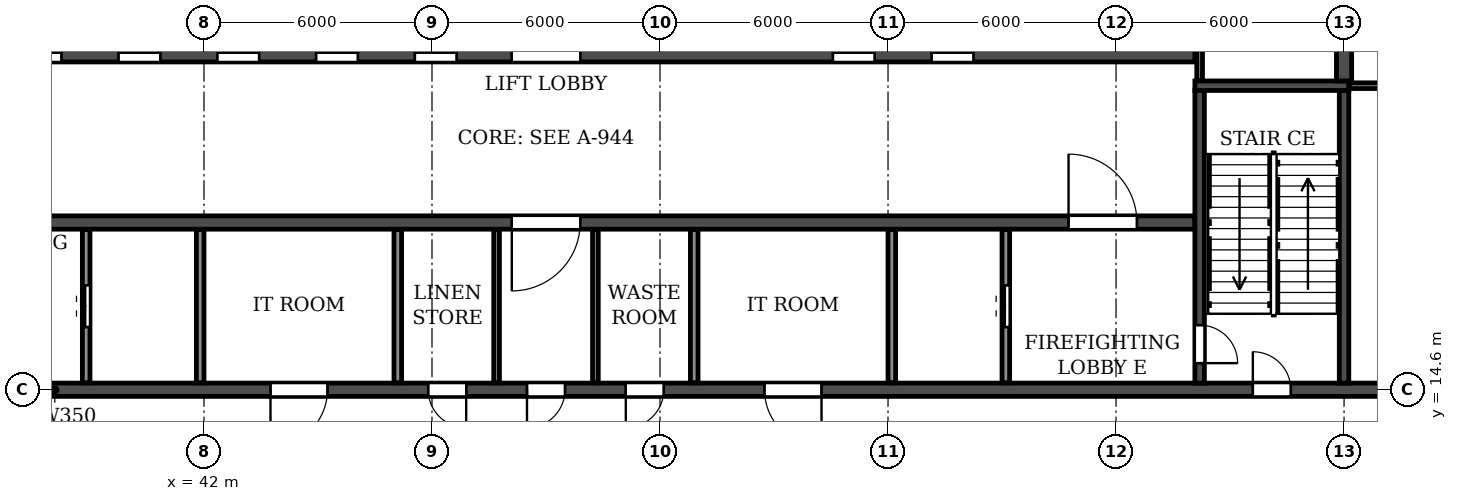
"""IFC4 building model, lengths in metres.
Left out: names, types, materials, properties, quantities, classifications, styles, units other than length and angle.
Written with IfcOpenShell. Run it as: python <this file> out.ifc"""

import sys

from ifc_helpers import new_model, si_unit, direction, frame, frame_2d, origin, place, context, subcontext, project, spatial, rectangle, extrude, element, fill, save


model = new_model("IFC4")
c1 = context("Model", 3, precision=1e-05, world=origin(), true_north=direction((0.0, 1.0)))
c2 = subcontext(c1, "Body", "Model", "MODEL_VIEW")
j1 = project(units=[si_unit("LENGTHUNIT", "METRE"), si_unit("PLANEANGLEUNIT", "RADIAN")], contexts=[c1])
p1 = place(None, origin())
s1 = spatial("IfcSite", under=j1, at=p1, CompositionType="ELEMENT")
p2 = place(p1, origin())
s2 = spatial("IfcBuilding", under=s1, at=p2, CompositionType="ELEMENT")
p3 = place(p2, frame((0.0, 0.0, 261.0)))
s3 = spatial("IfcBuildingStorey", under=s2, at=p3, CompositionType="ELEMENT", Elevation=261.0)
p4 = place(p3, frame((18.2, 14.6, 0.0), z_axis=(0.0, 0.0, 1.0), x_axis=(1.0, 0.0, 0.0)))
e1 = element("IfcWall", 1, at=p4, inside=s3, PredefinedType="SOLIDWALL", context=c2, shape_type="SweptSolid", body=[
    extrude(rectangle(XDim=65.6, YDim=0.35, at=frame_2d((32.8, 0.0))), origin(), (0.0, 0.0, 1.0), 5.7),
])
p5 = place(p4, frame((0.7, 0.0, 0.0)))
e2 = element("IfcOpeningElement", 2, at=p5, cuts=e1, PredefinedType="OPENING", context=c2, shape_type="SweptSolid", body=[
    extrude(rectangle(XDim=1.0, YDim=2.1, at=frame_2d((0.5, 1.05))), frame((0.0, 0.185, 0.0), z_axis=(0.0, -1.0, 0.0), x_axis=(1.0, 0.0, 0.0)), (0.0, 0.0, 1.0), 0.37),
])
p6 = place(p4, frame((8.7, 0.0, 0.0)))
e3 = element("IfcOpeningElement", 3, at=p6, cuts=e1, PredefinedType="OPENING", context=c2, shape_type="SweptSolid", body=[
    extrude(rectangle(XDim=0.8, YDim=2.1, at=frame_2d((0.4, 1.05))), frame((0.0, 0.185, 0.0), z_axis=(0.0, -1.0, 0.0), x_axis=(1.0, 0.0, 0.0)), (0.0, 0.0, 1.0), 0.37),
])
p7 = place(p4, frame((13.2, 0.0, 0.0)))
e4 = element("IfcOpeningElement", 4, at=p7, cuts=e1, PredefinedType="OPENING", context=c2, shape_type="SweptSolid", body=[
    extrude(rectangle(XDim=1.0, YDim=2.1, at=frame_2d((0.5, 1.05))), frame((0.0, 0.185, 0.0), z_axis=(0.0, -1.0, 0.0), x_axis=(1.0, 0.0, 0.0)), (0.0, 0.0, 1.0), 0.37),
])
p8 = place(p4, frame((25.55, 0.0, 0.0)))
e5 = element("IfcOpeningElement", 5, at=p8, cuts=e1, PredefinedType="OPENING", context=c2, shape_type="SweptSolid", body=[
    extrude(rectangle(XDim=1.5, YDim=2.1, at=frame_2d((0.75, 1.05))), frame((0.0, 0.185, 0.0), z_axis=(0.0, -1.0, 0.0), x_axis=(1.0, 0.0, 0.0)), (0.0, 0.0, 1.0), 0.37),
])
p9 = place(p4, frame((29.7, 0.0, 0.0)))
e6 = element("IfcOpeningElement", 6, at=p9, cuts=e1, PredefinedType="OPENING", context=c2, shape_type="SweptSolid", body=[
    extrude(rectangle(XDim=1.0, YDim=2.1, at=frame_2d((0.5, 1.05))), frame((0.0, 0.185, 0.0), z_axis=(0.0, -1.0, 0.0), x_axis=(1.0, 0.0, 0.0)), (0.0, 0.0, 1.0), 0.37),
])
p10 = place(p4, frame((32.3, 0.0, 0.0)))
e7 = element("IfcOpeningElement", 7, at=p10, cuts=e1, PredefinedType="OPENING", context=c2, shape_type="SweptSolid", body=[
    extrude(rectangle(XDim=1.0, YDim=2.1, at=frame_2d((0.5, 1.05))), frame((0.0, 0.185, 0.0), z_axis=(0.0, -1.0, 0.0), x_axis=(1.0, 0.0, 0.0)), (0.0, 0.0, 1.0), 0.37),
])
p11 = place(p4, frame((34.9, 0.0, 0.0)))
e8 = element("IfcOpeningElement", 8, at=p11, cuts=e1, PredefinedType="OPENING", context=c2, shape_type="SweptSolid", body=[
    extrude(rectangle(XDim=1.0, YDim=2.1, at=frame_2d((0.5, 1.05))), frame((0.0, 0.185, 0.0), z_axis=(0.0, -1.0, 0.0), x_axis=(1.0, 0.0, 0.0)), (0.0, 0.0, 1.0), 0.37),
])
p12 = place(p4, frame((38.55, 0.0, 0.0)))
e9 = element("IfcOpeningElement", 9, at=p12, cuts=e1, PredefinedType="OPENING", context=c2, shape_type="SweptSolid", body=[
    extrude(rectangle(XDim=1.5, YDim=2.1, at=frame_2d((0.75, 1.05))), frame((0.0, 0.185, 0.0), z_axis=(0.0, -1.0, 0.0), x_axis=(1.0, 0.0, 0.0)), (0.0, 0.0, 1.0), 0.37),
])
p13 = place(p4, frame((51.4, 0.0, 0.0)))
e10 = element("IfcOpeningElement", 10, at=p13, cuts=e1, PredefinedType="OPENING", context=c2, shape_type="SweptSolid", body=[
    extrude(rectangle(XDim=1.0, YDim=2.1, at=frame_2d((0.5, 1.05))), frame((0.0, 0.185, 0.0), z_axis=(0.0, -1.0, 0.0), x_axis=(1.0, 0.0, 0.0)), (0.0, 0.0, 1.0), 0.37),
])
p14 = place(p4, frame((56.1, 0.0, 0.0)))
e11 = element("IfcOpeningElement", 11, at=p14, cuts=e1, PredefinedType="OPENING", context=c2, shape_type="SweptSolid", body=[
    extrude(rectangle(XDim=0.8, YDim=2.1, at=frame_2d((0.4, 1.05))), frame((0.0, 0.185, 0.0), z_axis=(0.0, -1.0, 0.0), x_axis=(1.0, 0.0, 0.0)), (0.0, 0.0, 1.0), 0.37),
])
p15 = place(p4, frame((63.9, 0.0, 0.0)))
e12 = element("IfcOpeningElement", 12, at=p15, cuts=e1, PredefinedType="OPENING", context=c2, shape_type="SweptSolid", body=[
    extrude(rectangle(XDim=1.0, YDim=2.1, at=frame_2d((0.5, 1.05))), frame((0.0, 0.185, 0.0), z_axis=(0.0, -1.0, 0.0), x_axis=(1.0, 0.0, 0.0)), (0.0, 0.0, 1.0), 0.37),
])
p16 = place(p3, frame((33.925, 19.0, 0.0), z_axis=(0.0, 0.0, 1.0), x_axis=(1.0, 0.0, 0.0)))
e13 = element("IfcWall", 13, at=p16, inside=s3, PredefinedType="SOLIDWALL", context=c2, shape_type="SweptSolid", body=[
    extrude(rectangle(XDim=34.15, YDim=0.35, at=frame_2d((17.075, 0.0))), origin(), (0.0, 0.0, 1.0), 5.7),
])
p17 = place(p16, frame((16.175, 0.0, 0.0)))
e14 = element("IfcOpeningElement", 14, at=p17, cuts=e13, PredefinedType="OPENING", context=c2, shape_type="SweptSolid", body=[
    extrude(rectangle(XDim=1.8, YDim=2.1, at=frame_2d((0.9, 1.05))), frame((0.0, 0.185, 0.0), z_axis=(0.0, -1.0, 0.0), x_axis=(1.0, 0.0, 0.0)), (0.0, 0.0, 1.0), 0.37),
])
p18 = place(p16, frame((1.525, 0.0, 0.0)))
e15 = element("IfcOpeningElement", 15, at=p18, cuts=e13, PredefinedType="OPENING", context=c2, shape_type="SweptSolid", body=[
    extrude(rectangle(XDim=1.8, YDim=2.1, at=frame_2d((0.9, 1.05))), frame((0.0, 0.185, 0.0), z_axis=(0.0, -1.0, 0.0), x_axis=(1.0, 0.0, 0.0)), (0.0, 0.0, 1.0), 0.37),
])
p19 = place(p16, frame((30.825, 0.0, 0.0)))
e16 = element("IfcOpeningElement", 16, at=p19, cuts=e13, PredefinedType="OPENING", context=c2, shape_type="SweptSolid", body=[
    extrude(rectangle(XDim=1.8, YDim=2.1, at=frame_2d((0.9, 1.05))), frame((0.0, 0.185, 0.0), z_axis=(0.0, -1.0, 0.0), x_axis=(1.0, 0.0, 0.0)), (0.0, 0.0, 1.0), 0.37),
])
p20 = place(p3, frame((33.925, 23.4, 0.0), z_axis=(0.0, 0.0, 1.0), x_axis=(1.0, 0.0, 0.0)))
e17 = element("IfcWall", 17, at=p20, inside=s3, PredefinedType="SOLIDWALL", context=c2, shape_type="SweptSolid", body=[
    extrude(rectangle(XDim=34.15, YDim=0.35, at=frame_2d((17.075, 0.0))), origin(), (0.0, 0.0, 1.0), 5.7),
])
p21 = place(p20, frame((16.175, 0.0, 0.0)))
e18 = element("IfcOpeningElement", 18, at=p21, cuts=e17, PredefinedType="OPENING", context=c2, shape_type="SweptSolid", body=[
    extrude(rectangle(XDim=1.8, YDim=2.1, at=frame_2d((0.9, 1.05))), frame((0.0, 0.185, 0.0), z_axis=(0.0, -1.0, 0.0), x_axis=(1.0, 0.0, 0.0)), (0.0, 0.0, 1.0), 0.37),
])
p22 = place(p20, frame((0.625, 0.0, 0.0)))
e19 = element("IfcOpeningElement", 19, at=p22, cuts=e17, PredefinedType="OPENING", context=c2, shape_type="SweptSolid", body=[
    extrude(rectangle(XDim=1.1, YDim=2.1, at=frame_2d((0.55, 1.05))), frame((0.0, 0.185, 0.0), z_axis=(0.0, -1.0, 0.0), x_axis=(1.0, 0.0, 0.0)), (0.0, 0.0, 1.0), 0.37),
])
p23 = place(p20, frame((3.225, 0.0, 0.0)))
e20 = element("IfcOpeningElement", 20, at=p23, cuts=e17, PredefinedType="OPENING", context=c2, shape_type="SweptSolid", body=[
    extrude(rectangle(XDim=1.1, YDim=2.1, at=frame_2d((0.55, 1.05))), frame((0.0, 0.185, 0.0), z_axis=(0.0, -1.0, 0.0), x_axis=(1.0, 0.0, 0.0)), (0.0, 0.0, 1.0), 0.37),
])
p24 = place(p20, frame((5.825, 0.0, 0.0)))
e21 = element("IfcOpeningElement", 21, at=p24, cuts=e17, PredefinedType="OPENING", context=c2, shape_type="SweptSolid", body=[
    extrude(rectangle(XDim=1.1, YDim=2.1, at=frame_2d((0.55, 1.05))), frame((0.0, 0.185, 0.0), z_axis=(0.0, -1.0, 0.0), x_axis=(1.0, 0.0, 0.0)), (0.0, 0.0, 1.0), 0.37),
])
p25 = place(p20, frame((8.425, 0.0, 0.0)))
e22 = element("IfcOpeningElement", 22, at=p25, cuts=e17, PredefinedType="OPENING", context=c2, shape_type="SweptSolid", body=[
    extrude(rectangle(XDim=1.1, YDim=2.1, at=frame_2d((0.55, 1.05))), frame((0.0, 0.185, 0.0), z_axis=(0.0, -1.0, 0.0), x_axis=(1.0, 0.0, 0.0)), (0.0, 0.0, 1.0), 0.37),
])
p26 = place(p20, frame((11.025, 0.0, 0.0)))
e23 = element("IfcOpeningElement", 23, at=p26, cuts=e17, PredefinedType="OPENING", context=c2, shape_type="SweptSolid", body=[
    extrude(rectangle(XDim=1.1, YDim=2.1, at=frame_2d((0.55, 1.05))), frame((0.0, 0.185, 0.0), z_axis=(0.0, -1.0, 0.0), x_axis=(1.0, 0.0, 0.0)), (0.0, 0.0, 1.0), 0.37),
])
p27 = place(p20, frame((13.625, 0.0, 0.0)))
e24 = element("IfcOpeningElement", 24, at=p27, cuts=e17, PredefinedType="OPENING", context=c2, shape_type="SweptSolid", body=[
    extrude(rectangle(XDim=1.1, YDim=2.1, at=frame_2d((0.55, 1.05))), frame((0.0, 0.185, 0.0), z_axis=(0.0, -1.0, 0.0), x_axis=(1.0, 0.0, 0.0)), (0.0, 0.0, 1.0), 0.37),
])
p28 = place(p20, frame((24.625, 0.0, 0.0)))
e25 = element("IfcOpeningElement", 25, at=p28, cuts=e17, PredefinedType="OPENING", context=c2, shape_type="SweptSolid", body=[
    extrude(rectangle(XDim=1.1, YDim=2.1, at=frame_2d((0.55, 1.05))), frame((0.0, 0.185, 0.0), z_axis=(0.0, -1.0, 0.0), x_axis=(1.0, 0.0, 0.0)), (0.0, 0.0, 1.0), 0.37),
])
p29 = place(p20, frame((27.225, 0.0, 0.0)))
e26 = element("IfcOpeningElement", 26, at=p29, cuts=e17, PredefinedType="OPENING", context=c2, shape_type="SweptSolid", body=[
    extrude(rectangle(XDim=1.1, YDim=2.1, at=frame_2d((0.55, 1.05))), frame((0.0, 0.185, 0.0), z_axis=(0.0, -1.0, 0.0), x_axis=(1.0, 0.0, 0.0)), (0.0, 0.0, 1.0), 0.37),
])
p30 = place(p3, frame((72.0, 22.725, 0.0), z_axis=(0.0, 0.0, 1.0), x_axis=(0.0, 1.0, 0.0)))
e27 = element("IfcWall", 27, at=p30, inside=s3, PredefinedType="SOLIDWALL", context=c2, shape_type="SweptSolid", body=[
    extrude(rectangle(XDim=4.9, YDim=0.4, at=frame_2d((2.45, 0.0))), origin(), (0.0, 0.0, 1.0), 5.7),
])
p31 = place(p3, frame((68.2, 14.775, 0.0), z_axis=(0.0, 0.0, 1.0), x_axis=(0.0, 1.0, 0.0)))
e28 = element("IfcWall", 28, at=p31, inside=s3, PredefinedType="SOLIDWALL", context=c2, shape_type="SweptSolid", body=[
    extrude(rectangle(XDim=7.7, YDim=0.25, at=frame_2d((3.85, 0.0))), origin(), (0.0, 0.0, 1.0), 5.7),
])
p32 = place(p31, frame((0.525, 0.0, 0.0)))
e29 = element("IfcOpeningElement", 29, at=p32, cuts=e28, PredefinedType="OPENING", context=c2, shape_type="SweptSolid", body=[
    extrude(rectangle(XDim=1.0, YDim=2.1, at=frame_2d((0.5, 1.05))), frame((0.0, 0.135, 0.0), z_axis=(0.0, -1.0, 0.0), x_axis=(1.0, 0.0, 0.0)), (0.0, 0.0, 1.0), 0.27),
])
p33 = place(p3, frame((72.0, 14.775, 0.0), z_axis=(0.0, 0.0, 1.0), x_axis=(0.0, 1.0, 0.0)))
e30 = element("IfcWall", 30, at=p33, inside=s3, PredefinedType="SOLIDWALL", context=c2, shape_type="SweptSolid", body=[
    extrude(rectangle(XDim=7.7, YDim=0.25, at=frame_2d((3.85, 0.0))), origin(), (0.0, 0.0, 1.0), 5.7),
])
p34 = place(p3, frame((68.075, 22.6, 0.0), z_axis=(0.0, 0.0, 1.0), x_axis=(1.0, 0.0, 0.0)))
e31 = element("IfcWall", 31, at=p34, inside=s3, PredefinedType="SOLIDWALL", context=c2, shape_type="SweptSolid", body=[
    extrude(rectangle(XDim=4.05, YDim=0.25, at=frame_2d((2.025, 0.0))), origin(), (0.0, 0.0, 1.0), 5.7),
])
for number, where, z_axis, x_axis in (
    (32, (49.7, 14.785, 0.0), (0.0, 0.0, 1.0), (0.0, 1.0, 0.0)),
    (33, (52.3, 14.785, 0.0), (0.0, 0.0, 1.0), (0.0, 1.0, 0.0)),
):
    element("IfcWall", number, at=place(p3, frame(where, z_axis=z_axis, x_axis=x_axis)), inside=s3, PredefinedType="PARTITIONING", context=c2, shape_type="SweptSolid", body=[
        extrude(rectangle(XDim=4.03, YDim=0.15, at=frame_2d((2.015, 0.0))), origin(), (0.0, 0.0, 1.0), 5.7),
    ])
p35 = place(p3, frame((72.135, 22.6, 0.0), z_axis=(0.0, 0.0, 1.0), x_axis=(1.0, 0.0, 0.0)))
e34 = element("IfcWall", 34, at=p35, inside=s3, PredefinedType="PARTITIONING", context=c2, shape_type="SweptSolid", body=[
    extrude(rectangle(XDim=5.13, YDim=0.15, at=frame_2d((2.565, 0.0))), origin(), (0.0, 0.0, 1.0), 5.7),
])
for number, where, z_axis, x_axis in (
    (35, (47.1, 14.785, 0.0), (0.0, 0.0, 1.0), (0.0, 1.0, 0.0)),
    (36, (54.9, 14.785, 0.0), (0.0, 0.0, 1.0), (0.0, 1.0, 0.0)),
):
    element("IfcWall", number, at=place(p3, frame(where, z_axis=z_axis, x_axis=x_axis)), inside=s3, PredefinedType="PARTITIONING", context=c2, shape_type="SweptSolid", body=[
        extrude(rectangle(XDim=4.03, YDim=0.2, at=frame_2d((2.015, 0.0))), origin(), (0.0, 0.0, 1.0), 5.7),
    ])
p36 = place(p3, frame((68.2, 22.735, 0.0), z_axis=(0.0, 0.0, 1.0), x_axis=(0.0, 1.0, 0.0)))
e37 = element("IfcWall", 37, at=p36, inside=s3, PredefinedType="PARTITIONING", context=c2, shape_type="SweptSolid", body=[
    extrude(rectangle(XDim=4.88, YDim=0.15, at=frame_2d((2.44, 0.0))), origin(), (0.0, 0.0, 1.0), 5.7),
])
p37 = place(p3, frame((38.9, 14.785, 0.0), z_axis=(0.0, 0.0, 1.0), x_axis=(0.0, 1.0, 0.0)))
e38 = element("IfcWall", 38, at=p37, inside=s3, PredefinedType="PARTITIONING", context=c2, shape_type="SweptSolid", body=[
    extrude(rectangle(XDim=4.03, YDim=0.2, at=frame_2d((2.015, 0.0))), origin(), (0.0, 0.0, 1.0), 5.7),
])
p38 = place(p37, frame((1.465, 0.0, 0.0)))
e39 = element("IfcOpeningElement", 39, at=p38, cuts=e38, PredefinedType="OPENING", context=c2, shape_type="SweptSolid", body=[
    extrude(rectangle(XDim=1.1, YDim=2.1, at=frame_2d((0.55, 1.05))), frame((0.0, 0.11, 0.0), z_axis=(0.0, -1.0, 0.0), x_axis=(1.0, 0.0, 0.0)), (0.0, 0.0, 1.0), 0.22),
])
for number, where, z_axis, x_axis in (
    (40, (41.9, 14.785, 0.0), (0.0, 0.0, 1.0), (0.0, 1.0, 0.0)),
    (41, (60.1, 14.785, 0.0), (0.0, 0.0, 1.0), (0.0, 1.0, 0.0)),
):
    element("IfcWall", number, at=place(p3, frame(where, z_axis=z_axis, x_axis=x_axis)), inside=s3, PredefinedType="PARTITIONING", context=c2, shape_type="SweptSolid", body=[
        extrude(rectangle(XDim=4.03, YDim=0.2, at=frame_2d((2.015, 0.0))), origin(), (0.0, 0.0, 1.0), 5.7),
    ])
p39 = place(p3, frame((63.1, 14.785, 0.0), z_axis=(0.0, 0.0, 1.0), x_axis=(0.0, 1.0, 0.0)))
e42 = element("IfcWall", 42, at=p39, inside=s3, PredefinedType="PARTITIONING", context=c2, shape_type="SweptSolid", body=[
    extrude(rectangle(XDim=4.03, YDim=0.2, at=frame_2d((2.015, 0.0))), origin(), (0.0, 0.0, 1.0), 5.7),
])
p40 = place(p39, frame((1.465, 0.0, 0.0)))
e43 = element("IfcOpeningElement", 43, at=p40, cuts=e42, PredefinedType="OPENING", context=c2, shape_type="SweptSolid", body=[
    extrude(rectangle(XDim=1.1, YDim=2.1, at=frame_2d((0.55, 1.05))), frame((0.0, 0.11, 0.0), z_axis=(0.0, -1.0, 0.0), x_axis=(1.0, 0.0, 0.0)), (0.0, 0.0, 1.0), 0.22),
])
p41 = place(p8, frame((1.5, 0.0, 0.0), z_axis=(0.0, 0.0, 1.0), x_axis=(-1.0, 0.0, 0.0)))
e44 = element("IfcDoor", 44, at=p41, inside=s3, OperationType="DOUBLE_DOOR_SINGLE_SWING", PredefinedType="DOOR", context=c2, shape_type="SweptSolid", body=[
    extrude(rectangle(XDim=1.5, YDim=2.1, at=frame_2d((0.75, 1.05))), frame((0.0, 0.025, 0.0), z_axis=(0.0, -1.0, 0.0), x_axis=(1.0, 0.0, 0.0)), (0.0, 0.0, 1.0), 0.05),
])
fill(e5, e44)
p42 = place(p9, frame((1.0, 0.0, 0.0), z_axis=(0.0, 0.0, 1.0), x_axis=(-1.0, 0.0, 0.0)))
e45 = element("IfcDoor", 45, at=p42, inside=s3, OperationType="SINGLE_SWING_LEFT", PredefinedType="DOOR", context=c2, shape_type="SweptSolid", body=[
    extrude(rectangle(XDim=1.0, YDim=2.1, at=frame_2d((0.5, 1.05))), frame((0.0, 0.025, 0.0), z_axis=(0.0, -1.0, 0.0), x_axis=(1.0, 0.0, 0.0)), (0.0, 0.0, 1.0), 0.05),
])
fill(e6, e45)
p43 = place(p10, frame((1.0, 0.0, 0.0), z_axis=(0.0, 0.0, 1.0), x_axis=(-1.0, 0.0, 0.0)))
e46 = element("IfcDoor", 46, at=p43, inside=s3, OperationType="SINGLE_SWING_RIGHT", PredefinedType="DOOR", context=c2, shape_type="SweptSolid", body=[
    extrude(rectangle(XDim=1.0, YDim=2.1, at=frame_2d((0.5, 1.05))), frame((0.0, 0.025, 0.0), z_axis=(0.0, -1.0, 0.0), x_axis=(1.0, 0.0, 0.0)), (0.0, 0.0, 1.0), 0.05),
])
fill(e7, e46)
p44 = place(p11, frame((1.0, 0.0, 0.0), z_axis=(0.0, 0.0, 1.0), x_axis=(-1.0, 0.0, 0.0)))
e47 = element("IfcDoor", 47, at=p44, inside=s3, OperationType="SINGLE_SWING_RIGHT", PredefinedType="DOOR", context=c2, shape_type="SweptSolid", body=[
    extrude(rectangle(XDim=1.0, YDim=2.1, at=frame_2d((0.5, 1.05))), frame((0.0, 0.025, 0.0), z_axis=(0.0, -1.0, 0.0), x_axis=(1.0, 0.0, 0.0)), (0.0, 0.0, 1.0), 0.05),
])
fill(e8, e47)
p45 = place(p12, frame((1.5, 0.0, 0.0), z_axis=(0.0, 0.0, 1.0), x_axis=(-1.0, 0.0, 0.0)))
e48 = element("IfcDoor", 48, at=p45, inside=s3, OperationType="DOUBLE_DOOR_SINGLE_SWING", PredefinedType="DOOR", context=c2, shape_type="SweptSolid", body=[
    extrude(rectangle(XDim=1.5, YDim=2.1, at=frame_2d((0.75, 1.05))), frame((0.0, 0.025, 0.0), z_axis=(0.0, -1.0, 0.0), x_axis=(1.0, 0.0, 0.0)), (0.0, 0.0, 1.0), 0.05),
])
fill(e9, e48)
p46 = place(p13, origin())
e49 = element("IfcDoor", 49, at=p46, inside=s3, OperationType="SINGLE_SWING_LEFT", PredefinedType="DOOR", context=c2, shape_type="SweptSolid", body=[
    extrude(rectangle(XDim=1.0, YDim=2.1, at=frame_2d((0.5, 1.05))), frame((0.0, 0.025, 0.0), z_axis=(0.0, -1.0, 0.0), x_axis=(1.0, 0.0, 0.0)), (0.0, 0.0, 1.0), 0.05),
])
fill(e10, e49)
p47 = place(p40, origin())
e50 = element("IfcDoor", 50, at=p47, inside=s3, OperationType="DOUBLE_DOOR_SLIDING", PredefinedType="DOOR", context=c2, shape_type="SweptSolid", body=[
    extrude(rectangle(XDim=1.1, YDim=2.1, at=frame_2d((0.55, 1.05))), frame((0.0, 0.025, 0.0), z_axis=(0.0, -1.0, 0.0), x_axis=(1.0, 0.0, 0.0)), (0.0, 0.0, 1.0), 0.05),
])
fill(e43, e50)
p48 = place(p32, frame((1.0, 0.0, 0.0), z_axis=(0.0, 0.0, 1.0), x_axis=(-1.0, 0.0, 0.0)))
e51 = element("IfcDoor", 51, at=p48, inside=s3, OperationType="SINGLE_SWING_RIGHT", PredefinedType="DOOR", context=c2, shape_type="SweptSolid", body=[
    extrude(rectangle(XDim=1.0, YDim=2.1, at=frame_2d((0.5, 1.05))), frame((0.0, 0.025, 0.0), z_axis=(0.0, -1.0, 0.0), x_axis=(1.0, 0.0, 0.0)), (0.0, 0.0, 1.0), 0.05),
])
fill(e29, e51)
p49 = place(p38, origin())
e52 = element("IfcDoor", 52, at=p49, inside=s3, OperationType="DOUBLE_DOOR_SLIDING", PredefinedType="DOOR", context=c2, shape_type="SweptSolid", body=[
    extrude(rectangle(XDim=1.1, YDim=2.1, at=frame_2d((0.55, 1.05))), frame((0.0, 0.025, 0.0), z_axis=(0.0, -1.0, 0.0), x_axis=(1.0, 0.0, 0.0)), (0.0, 0.0, 1.0), 0.05),
])
fill(e39, e52)
p50 = place(p21, origin())
e53 = element("IfcDoor", 53, at=p50, inside=s3, OperationType="DOUBLE_DOOR_SINGLE_SWING", PredefinedType="DOOR", context=c2, shape_type="SweptSolid", body=[
    extrude(rectangle(XDim=1.8, YDim=2.1, at=frame_2d((0.9, 1.05))), frame((0.0, 0.025, 0.0), z_axis=(0.0, -1.0, 0.0), x_axis=(1.0, 0.0, 0.0)), (0.0, 0.0, 1.0), 0.05),
])
fill(e18, e53)
p51 = place(p17, frame((1.8, 0.0, 0.0), z_axis=(0.0, 0.0, 1.0), x_axis=(-1.0, 0.0, 0.0)))
e54 = element("IfcDoor", 54, at=p51, inside=s3, OperationType="DOUBLE_DOOR_SINGLE_SWING", PredefinedType="DOOR", context=c2, shape_type="SweptSolid", body=[
    extrude(rectangle(XDim=1.8, YDim=2.1, at=frame_2d((0.9, 1.05))), frame((0.0, 0.025, 0.0), z_axis=(0.0, -1.0, 0.0), x_axis=(1.0, 0.0, 0.0)), (0.0, 0.0, 1.0), 0.05),
])
fill(e14, e54)
p52 = place(p23, origin())
e55 = element("IfcDoor", 55, at=p52, inside=s3, OperationType="DOUBLE_DOOR_SLIDING", PredefinedType="DOOR", context=c2, shape_type="SweptSolid", body=[
    extrude(rectangle(XDim=1.1, YDim=2.1, at=frame_2d((0.55, 1.05))), frame((0.0, 0.025, 0.0), z_axis=(0.0, -1.0, 0.0), x_axis=(1.0, 0.0, 0.0)), (0.0, 0.0, 1.0), 0.05),
])
fill(e20, e55)
p53 = place(p24, origin())
e56 = element("IfcDoor", 56, at=p53, inside=s3, OperationType="DOUBLE_DOOR_SLIDING", PredefinedType="DOOR", context=c2, shape_type="SweptSolid", body=[
    extrude(rectangle(XDim=1.1, YDim=2.1, at=frame_2d((0.55, 1.05))), frame((0.0, 0.025, 0.0), z_axis=(0.0, -1.0, 0.0), x_axis=(1.0, 0.0, 0.0)), (0.0, 0.0, 1.0), 0.05),
])
fill(e21, e56)
p54 = place(p25, origin())
e57 = element("IfcDoor", 57, at=p54, inside=s3, OperationType="DOUBLE_DOOR_SLIDING", PredefinedType="DOOR", context=c2, shape_type="SweptSolid", body=[
    extrude(rectangle(XDim=1.1, YDim=2.1, at=frame_2d((0.55, 1.05))), frame((0.0, 0.025, 0.0), z_axis=(0.0, -1.0, 0.0), x_axis=(1.0, 0.0, 0.0)), (0.0, 0.0, 1.0), 0.05),
])
fill(e22, e57)
p55 = place(p26, origin())
e58 = element("IfcDoor", 58, at=p55, inside=s3, OperationType="DOUBLE_DOOR_SLIDING", PredefinedType="DOOR", context=c2, shape_type="SweptSolid", body=[
    extrude(rectangle(XDim=1.1, YDim=2.1, at=frame_2d((0.55, 1.05))), frame((0.0, 0.025, 0.0), z_axis=(0.0, -1.0, 0.0), x_axis=(1.0, 0.0, 0.0)), (0.0, 0.0, 1.0), 0.05),
])
fill(e23, e58)
p56 = place(p27, origin())
e59 = element("IfcDoor", 59, at=p56, inside=s3, OperationType="DOUBLE_DOOR_SLIDING", PredefinedType="DOOR", context=c2, shape_type="SweptSolid", body=[
    extrude(rectangle(XDim=1.1, YDim=2.1, at=frame_2d((0.55, 1.05))), frame((0.0, 0.025, 0.0), z_axis=(0.0, -1.0, 0.0), x_axis=(1.0, 0.0, 0.0)), (0.0, 0.0, 1.0), 0.05),
])
fill(e24, e59)
p57 = place(p28, origin())
e60 = element("IfcDoor", 60, at=p57, inside=s3, OperationType="DOUBLE_DOOR_SLIDING", PredefinedType="DOOR", context=c2, shape_type="SweptSolid", body=[
    extrude(rectangle(XDim=1.1, YDim=2.1, at=frame_2d((0.55, 1.05))), frame((0.0, 0.025, 0.0), z_axis=(0.0, -1.0, 0.0), x_axis=(1.0, 0.0, 0.0)), (0.0, 0.0, 1.0), 0.05),
])
fill(e25, e60)
p58 = place(p29, origin())
e61 = element("IfcDoor", 61, at=p58, inside=s3, OperationType="DOUBLE_DOOR_SLIDING", PredefinedType="DOOR", context=c2, shape_type="SweptSolid", body=[
    extrude(rectangle(XDim=1.1, YDim=2.1, at=frame_2d((0.55, 1.05))), frame((0.0, 0.025, 0.0), z_axis=(0.0, -1.0, 0.0), x_axis=(1.0, 0.0, 0.0)), (0.0, 0.0, 1.0), 0.05),
])
fill(e26, e61)
p59 = place(p19, origin())
e62 = element("IfcDoor", 62, at=p59, inside=s3, OperationType="DOUBLE_DOOR_SINGLE_SWING", PredefinedType="DOOR", context=c2, shape_type="SweptSolid", body=[
    extrude(rectangle(XDim=1.8, YDim=2.1, at=frame_2d((0.9, 1.05))), frame((0.0, 0.025, 0.0), z_axis=(0.0, -1.0, 0.0), x_axis=(1.0, 0.0, 0.0)), (0.0, 0.0, 1.0), 0.05),
])
fill(e16, e62)
save(model, sys.argv[1])
